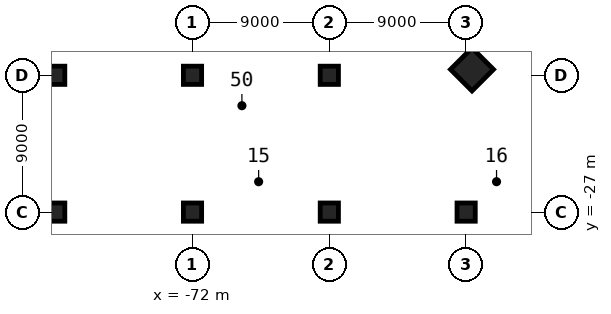
"""IFC4 building model, lengths in metres.
Left out: names, types, materials, properties, quantities, classifications, styles, units other than length and angle.
Written with IfcOpenShell. Run it as: python <this file> out.ifc"""

import sys

from ifc_helpers import new_model, si_unit, direction, frame, origin, origin_2d, place, context, subcontext, project, spatial, rectangle, extrude, element, save


model = new_model("IFC4")
c1 = context("Model", 3, precision=1e-05, world=origin(), true_north=direction((0.0, 1.0)))
c2 = subcontext(c1, "Body", "Model", "MODEL_VIEW")
j1 = project(units=[si_unit("LENGTHUNIT", "METRE"), si_unit("PLANEANGLEUNIT", "RADIAN")], contexts=[c1])
p1 = place(None, origin())
s1 = spatial("IfcSite", under=j1, at=p1, CompositionType="ELEMENT")
p2 = place(p1, origin())
s2 = spatial("IfcBuilding", under=s1, at=p2, CompositionType="ELEMENT")
p3 = place(p2, frame((0.0, 0.0, -9.0)))
s3 = spatial("IfcBuildingStorey", under=s2, at=p3, CompositionType="ELEMENT", Elevation=-9.0)
for number, where, z_axis, x_axis in (
    (1, (-81.0, -27.0, 0.0), (0.0, 0.0, 1.0), (1.0, 0.0, 0.0)),
    (2, (-81.0, -18.0, 0.0), (0.0, 0.0, 1.0), (1.0, 0.0, 0.0)),
    (3, (-72.0, -27.0, 0.0), (0.0, 0.0, 1.0), (1.0, 0.0, 0.0)),
    (4, (-72.0, -18.0, 0.0), (0.0, 0.0, 1.0), (1.0, 0.0, 0.0)),
    (5, (-63.0, -27.0, 0.0), (0.0, 0.0, 1.0), (1.0, 0.0, 0.0)),
    (6, (-63.0, -18.0, 0.0), (0.0, 0.0, 1.0), (1.0, 0.0, 0.0)),
    (7, (-54.0, -27.0, 0.0), (0.0, 0.0, 1.0), (1.0, 0.0, 0.0)),
):
    element("IfcColumn", number, at=place(p3, frame(where, z_axis=z_axis, x_axis=x_axis)), inside=s3, PredefinedType="COLUMN", context=c2, shape_type="SweptSolid", body=[
        extrude(rectangle(XDim=1.2, YDim=1.2, at=origin_2d()), origin(), (0.0, 0.0, 1.0), 4.5),
    ])
p4 = place(p3, frame((-53.614, -17.614, 0.0), z_axis=(0.0, 0.0, 1.0), x_axis=(-0.707106781187, -0.707106781187, 0.0)))
e8 = element("IfcColumn", 8, at=p4, inside=s3, PredefinedType="COLUMN", context=c2, shape_type="SweptSolid", body=[
    extrude(rectangle(XDim=2.0, YDim=2.0, at=origin_2d()), origin(), (0.0, 0.0, 1.0), 4.5),
])
save(model, sys.argv[1])
